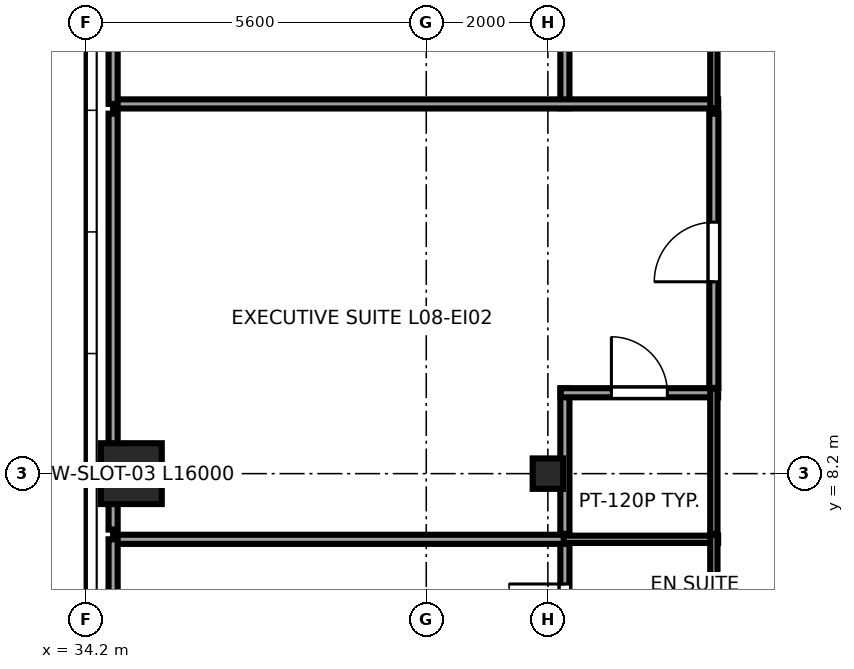
"""IFC4 building model, lengths in metres.
Left out: names, types, materials, properties, quantities, classifications, styles, units other than length and angle.
Written with IfcOpenShell. Run it as: python <this file> out.ifc"""

import sys

from ifc_helpers import new_model, si_unit, direction, frame, frame_2d, origin, origin_2d, place, context, subcontext, project, spatial, rectangle, i_section, extrude, source, transform, mapped, element, fill, save


model = new_model("IFC4")
c1 = context("Model", 3, precision=1e-05, world=origin(), true_north=direction((0.0, 1.0)))
c2 = subcontext(c1, "Body", "Model", "MODEL_VIEW")
j1 = project(units=[si_unit("LENGTHUNIT", "METRE"), si_unit("PLANEANGLEUNIT", "RADIAN")], contexts=[c1])
p1 = place(None, origin())
s1 = spatial("IfcSite", under=j1, at=p1, CompositionType="ELEMENT")
p2 = place(p1, origin())
s2 = spatial("IfcBuilding", under=s1, at=p2, CompositionType="ELEMENT")
p3 = place(p2, frame((0.0, 0.0, 39.1)))
s3 = spatial("IfcBuildingStorey", under=s2, at=p3, CompositionType="ELEMENT", Elevation=39.1)
m1 = source(origin(), c2, "Body", "SweptSolid", [
    extrude(rectangle(XDim=1.0, YDim=1.0, at=origin_2d()), origin(), (0.0, 0.0, 1.0), 3.55),
])
p4 = place(p3, frame((34.95, 8.2, 0.0), z_axis=(0.0, 0.0, 1.0), x_axis=(1.0, 0.0, 0.0)))
e1 = element("IfcColumn", 1, at=p4, inside=s3, PredefinedType="COLUMN", context=c2, shape_type="MappedRepresentation", body=[
    mapped(m1, transform((0.0, 0.0, 0.0), x_axis=(1.0, 0.0, 0.0), y_axis=(0.0, 1.0, 0.0), z_axis=(0.0, 0.0, 1.0), scale=1.0)),
])
m2 = source(origin(), c2, "Body", "SweptSolid", [
    extrude(i_section(OverallWidth=0.5, OverallDepth=0.5, WebThickness=0.028, FlangeThickness=0.045, at=origin_2d()), origin(), (0.0, 0.0, 1.0), 3.55),
])
p5 = place(p3, frame((41.8, 8.2, 0.0), z_axis=(0.0, 0.0, 1.0), x_axis=(1.0, 0.0, 0.0)))
e2 = element("IfcColumn", 2, at=p5, inside=s3, PredefinedType="COLUMN", context=c2, shape_type="MappedRepresentation", body=[
    mapped(m2, transform((0.0, 0.0, 0.0), x_axis=(1.0, 0.0, 0.0), y_axis=(0.0, 1.0, 0.0), z_axis=(0.0, 0.0, 1.0), scale=1.0)),
])
p6 = place(p3, frame((42.08, 4.8, 0.0), z_axis=(0.0, 0.0, 1.0), x_axis=(0.0, 1.0, 0.0)))
e3 = element("IfcWall", 3, at=p6, inside=s3, PredefinedType="PARTITIONING", context=c2, shape_type="SweptSolid", body=[
    extrude(rectangle(XDim=2.39, YDim=0.15, at=frame_2d((1.195, 0.0))), origin(), (0.0, 0.0, 1.0), 3.37),
])
p7 = place(p6, frame((0.665, 0.0, 0.0)))
e4 = element("IfcOpeningElement", 4, at=p7, cuts=e3, PredefinedType="OPENING", context=c2, shape_type="SweptSolid", body=[
    extrude(rectangle(XDim=0.92, YDim=2.01, at=frame_2d((0.46, 1.005))), frame((0.0, 0.085, 0.0), z_axis=(0.0, -1.0, 0.0), x_axis=(1.0, 0.0, 0.0)), (0.0, 0.0, 1.0), 0.17),
])
p8 = place(p3, frame((42.01, 7.12, 0.0), z_axis=(0.0, 0.0, 1.0), x_axis=(1.0, 0.0, 0.0)))
e5 = element("IfcWall", 5, at=p8, inside=s3, PredefinedType="PLUMBINGWALL", context=c2, shape_type="SweptSolid", body=[
    extrude(rectangle(XDim=2.59, YDim=0.12, at=frame_2d((1.295, 0.0))), origin(), (0.0, 0.0, 1.0), 3.37),
])
p9 = place(p3, frame((44.53, 4.8, 0.0), z_axis=(0.0, 0.0, 1.0), x_axis=(0.0, 1.0, 0.0)))
e6 = element("IfcWall", 6, at=p9, inside=s3, PredefinedType="PLUMBINGWALL", context=c2, shape_type="SweptSolid", body=[
    extrude(rectangle(XDim=2.39, YDim=0.12, at=frame_2d((1.195, 0.0))), origin(), (0.0, 0.0, 1.0), 3.37),
])
p10 = place(p3, frame((42.08, 7.21, 0.0), z_axis=(0.0, 0.0, 1.0), x_axis=(0.0, 1.0, 0.0)))
e7 = element("IfcWall", 7, at=p10, inside=s3, PredefinedType="PARTITIONING", context=c2, shape_type="SweptSolid", body=[
    extrude(rectangle(XDim=2.39, YDim=0.15, at=frame_2d((1.195, 0.0))), origin(), (0.0, 0.0, 1.0), 3.37),
])
p11 = place(p3, frame((42.01, 9.53, 0.0), z_axis=(0.0, 0.0, 1.0), x_axis=(1.0, 0.0, 0.0)))
e8 = element("IfcWall", 8, at=p11, inside=s3, PredefinedType="PARTITIONING", context=c2, shape_type="SweptSolid", body=[
    extrude(rectangle(XDim=2.59, YDim=0.15, at=frame_2d((1.295, 0.0))), origin(), (0.0, 0.0, 1.0), 3.37),
])
p12 = place(p11, frame((0.835, 0.0, 0.0)))
e9 = element("IfcOpeningElement", 9, at=p12, cuts=e8, PredefinedType="OPENING", context=c2, shape_type="SweptSolid", body=[
    extrude(rectangle(XDim=0.92, YDim=2.01, at=frame_2d((0.46, 1.005))), frame((0.0, 0.085, 0.0), z_axis=(0.0, -1.0, 0.0), x_axis=(1.0, 0.0, 0.0)), (0.0, 0.0, 1.0), 0.17),
])
p13 = place(p3, frame((44.53, 7.21, 0.0), z_axis=(0.0, 0.0, 1.0), x_axis=(0.0, 1.0, 0.0)))
e10 = element("IfcWall", 10, at=p13, inside=s3, PredefinedType="PLUMBINGWALL", context=c2, shape_type="SweptSolid", body=[
    extrude(rectangle(XDim=2.39, YDim=0.12, at=frame_2d((1.195, 0.0))), origin(), (0.0, 0.0, 1.0), 3.37),
])
p14 = place(p3, frame((42.08, 14.21, 0.0), z_axis=(0.0, 0.0, 1.0), x_axis=(0.0, 1.0, 0.0)))
e11 = element("IfcWall", 11, at=p14, inside=s3, PredefinedType="PARTITIONING", context=c2, shape_type="SweptSolid", body=[
    extrude(rectangle(XDim=2.39, YDim=0.15, at=frame_2d((1.195, 0.0))), origin(), (0.0, 0.0, 1.0), 3.37),
])
p15 = place(p3, frame((34.65, 14.28, 0.0), z_axis=(0.0, 0.0, 1.0), x_axis=(1.0, 0.0, 0.0)))
e12 = element("IfcWall", 12, at=p15, inside=s3, PredefinedType="PARTITIONING", context=c2, shape_type="SweptSolid", body=[
    extrude(rectangle(XDim=9.95, YDim=0.15, at=frame_2d((4.975, 0.0))), origin(), (0.0, 0.0, 1.0), 3.37),
])
p16 = place(p3, frame((44.53, 14.21, 0.0), z_axis=(0.0, 0.0, 1.0), x_axis=(0.0, 1.0, 0.0)))
e13 = element("IfcWall", 13, at=p16, inside=s3, PredefinedType="PLUMBINGWALL", context=c2, shape_type="SweptSolid", body=[
    extrude(rectangle(XDim=2.39, YDim=0.12, at=frame_2d((1.195, 0.0))), origin(), (0.0, 0.0, 1.0), 3.37),
])
p17 = place(p3, frame((34.65, 7.12, 0.0), z_axis=(0.0, 0.0, 1.0), x_axis=(1.0, 0.0, 0.0)))
e14 = element("IfcWall", 14, at=p17, inside=s3, PredefinedType="PARTITIONING", context=c2, shape_type="SweptSolid", body=[
    extrude(rectangle(XDim=7.41, YDim=0.15, at=frame_2d((3.705, 0.0))), origin(), (0.0, 0.0, 1.0), 3.37),
])
p18 = place(p3, frame((34.65, 0.405, 0.0), z_axis=(0.0, 0.0, 1.0), x_axis=(0.0, 1.0, 0.0)))
e15 = element("IfcWall", 15, at=p18, inside=s3, PredefinedType="PARTITIONING", context=c2, shape_type="SweptSolid", body=[
    extrude(rectangle(XDim=6.715, YDim=0.15, at=frame_2d((3.357, 0.0))), origin(), (0.0, 0.0, 1.0), 3.37),
])
p19 = place(p3, frame((44.53, 9.61, 0.0), z_axis=(0.0, 0.0, 1.0), x_axis=(0.0, 1.0, 0.0)))
e16 = element("IfcWall", 16, at=p19, inside=s3, PredefinedType="PARTITIONING", context=c2, shape_type="SweptSolid", body=[
    extrude(rectangle(XDim=4.51, YDim=0.15, at=frame_2d((2.255, 0.0))), origin(), (0.0, 0.0, 1.0), 3.37),
])
p20 = place(p19, frame((1.745, 0.0, 0.0)))
e17 = element("IfcOpeningElement", 17, at=p20, cuts=e16, PredefinedType="OPENING", context=c2, shape_type="SweptSolid", body=[
    extrude(rectangle(XDim=0.98, YDim=2.12, at=frame_2d((0.49, 1.06))), frame((0.0, 0.085, 0.0), z_axis=(0.0, -1.0, 0.0), x_axis=(1.0, 0.0, 0.0)), (0.0, 0.0, 1.0), 0.17),
])
p21 = place(p3, frame((34.65, 7.28, 0.0), z_axis=(0.0, 0.0, 1.0), x_axis=(0.0, 1.0, 0.0)))
e18 = element("IfcWall", 18, at=p21, inside=s3, PredefinedType="PARTITIONING", context=c2, shape_type="SweptSolid", body=[
    extrude(rectangle(XDim=6.84, YDim=0.15, at=frame_2d((3.42, 0.0))), origin(), (0.0, 0.0, 1.0), 3.37),
])
p22 = place(p3, frame((34.65, 14.28, 0.0), z_axis=(0.0, 0.0, 1.0), x_axis=(0.0, 1.0, 0.0)))
e19 = element("IfcWall", 19, at=p22, inside=s3, PredefinedType="PARTITIONING", context=c2, shape_type="SweptSolid", body=[
    extrude(rectangle(XDim=6.94, YDim=0.15, at=frame_2d((3.47, 0.0))), origin(), (0.0, 0.0, 1.0), 3.37),
])
m3 = source(origin(), c2, "Body", "SweptSolid", [
    extrude(rectangle(XDim=0.92, YDim=2.01, at=frame_2d((0.46, 1.005))), frame((0.0, 0.025, 0.0), z_axis=(0.0, -1.0, 0.0), x_axis=(1.0, 0.0, 0.0)), (0.0, 0.0, 1.0), 0.05),
])
p23 = place(p7, origin())
e20 = element("IfcDoor", 20, at=p23, inside=s3, OperationType="SINGLE_SWING_RIGHT", PredefinedType="DOOR", context=c2, shape_type="MappedRepresentation", body=[
    mapped(m3, transform((0.0, 0.0, 0.0), x_axis=(1.0, 0.0, 0.0), y_axis=(0.0, 1.0, 0.0), z_axis=(0.0, 0.0, 1.0), scale=1.0)),
])
fill(e4, e20)
p24 = place(p12, origin())
e21 = element("IfcDoor", 21, at=p24, inside=s3, OperationType="SINGLE_SWING_LEFT", PredefinedType="DOOR", context=c2, shape_type="MappedRepresentation", body=[
    mapped(m3, transform((0.0, 0.0, 0.0), x_axis=(1.0, 0.0, 0.0), y_axis=(0.0, 1.0, 0.0), z_axis=(0.0, 0.0, 1.0), scale=1.0)),
])
fill(e9, e21)
m4 = source(origin(), c2, "Body", "SweptSolid", [
    extrude(rectangle(XDim=0.98, YDim=2.12, at=frame_2d((0.49, 1.06))), frame((0.0, 0.025, 0.0), z_axis=(0.0, -1.0, 0.0), x_axis=(1.0, 0.0, 0.0)), (0.0, 0.0, 1.0), 0.05),
])
p25 = place(p20, origin())
e22 = element("IfcDoor", 22, at=p25, inside=s3, OperationType="SINGLE_SWING_LEFT", PredefinedType="DOOR", context=c2, shape_type="MappedRepresentation", body=[
    mapped(m4, transform((0.0, 0.0, 0.0), x_axis=(1.0, 0.0, 0.0), y_axis=(0.0, 1.0, 0.0), z_axis=(0.0, 0.0, 1.0), scale=1.0)),
])
fill(e17, e22)
save(model, sys.argv[1])
